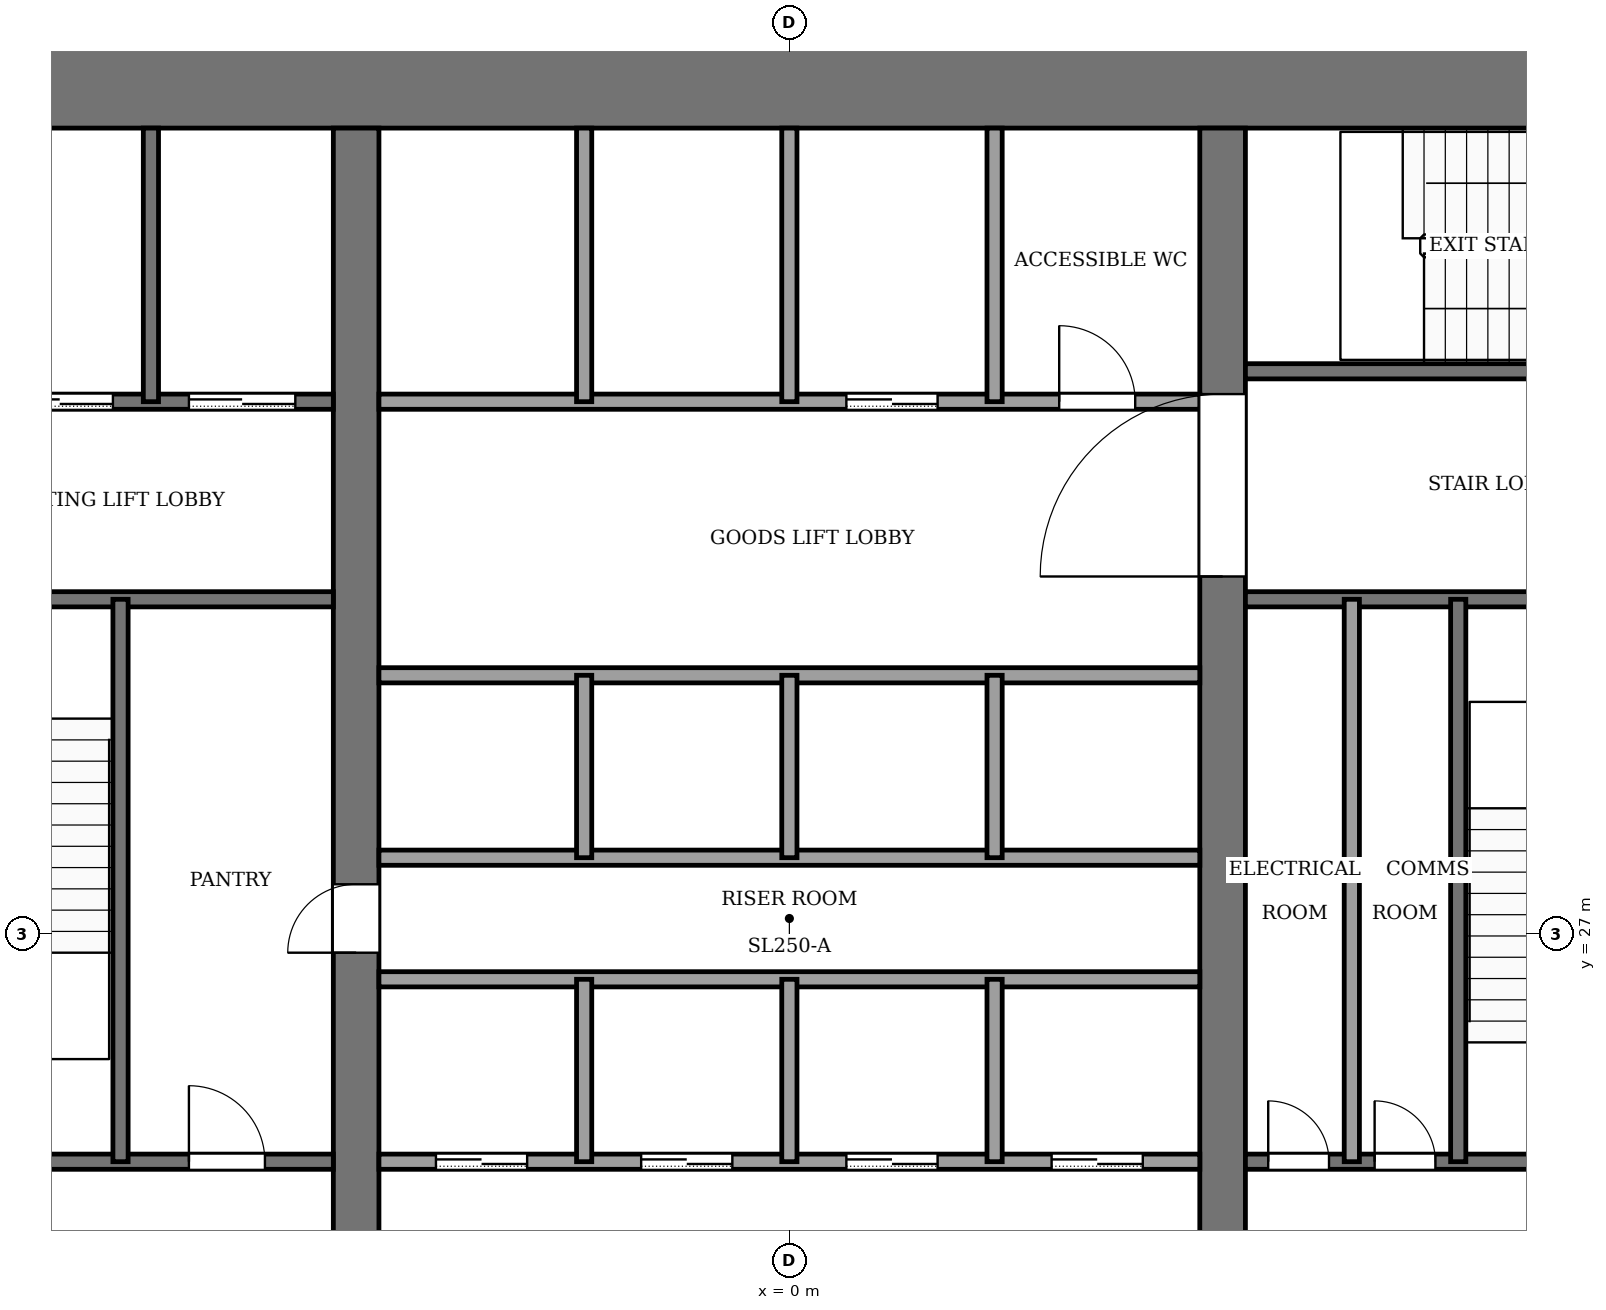
"""IFC4 building model, lengths in metres.
Left out: names, types, materials, properties, quantities, classifications, styles, units other than length and angle.
Written with IfcOpenShell. Run it as: python <this file> out.ifc"""

import sys

from ifc_helpers import new_model, si_unit, direction, frame, frame_2d, origin, place, context, subcontext, project, spatial, rectangle, extrude, element, fill, save


model = new_model("IFC4")
c1 = context("Model", 3, precision=1e-05, world=origin(), true_north=direction((0.0, 1.0)))
c2 = subcontext(c1, "Body", "Model", "MODEL_VIEW")
j1 = project(units=[si_unit("LENGTHUNIT", "METRE"), si_unit("PLANEANGLEUNIT", "RADIAN")], contexts=[c1])
p1 = place(None, origin())
s1 = spatial("IfcSite", under=j1, at=p1, CompositionType="ELEMENT")
p2 = place(p1, origin())
s2 = spatial("IfcBuilding", under=s1, at=p2, CompositionType="ELEMENT")
p3 = place(p2, frame((0.0, 0.0, 46.0)))
s3 = spatial("IfcBuildingStorey", under=s2, at=p3, CompositionType="ELEMENT", Elevation=46.0)
p4 = place(p3, frame((-14.0, 38.3, -0.13), z_axis=(0.0, 0.0, 1.0), x_axis=(1.0, 0.0, 0.0)))
e1 = element("IfcWall", 1, at=p4, inside=s3, PredefinedType="SHEAR", context=c2, shape_type="SweptSolid", body=[
    extrude(rectangle(XDim=28.0, YDim=1.4, at=frame_2d((14.0, 0.0))), origin(), (0.0, 0.0, 1.0), 4.0),
])
p5 = place(p3, frame((-5.7, 18.4, -0.13), z_axis=(0.0, 0.0, 1.0), x_axis=(0.0, 1.0, 0.0)))
e2 = element("IfcWall", 2, at=p5, inside=s3, PredefinedType="SHEAR", context=c2, shape_type="SweptSolid", body=[
    extrude(rectangle(XDim=19.2, YDim=0.6, at=frame_2d((9.6, 0.0))), origin(), (0.0, 0.0, 1.0), 4.0),
])
p6 = place(p5, frame((8.35, 0.0, 0.13)))
e3 = element("IfcOpeningElement", 3, at=p6, cuts=e2, PredefinedType="OPENING", context=c2, shape_type="SweptSolid", body=[
    extrude(rectangle(XDim=0.9, YDim=2.1, at=frame_2d((0.45, 1.05))), frame((0.0, 0.31, 0.0), z_axis=(0.0, -1.0, 0.0), x_axis=(1.0, 0.0, 0.0)), (0.0, 0.0, 1.0), 0.62),
])
p7 = place(p3, frame((5.7, 18.4, -0.13), z_axis=(0.0, 0.0, 1.0), x_axis=(0.0, 1.0, 0.0)))
e4 = element("IfcWall", 4, at=p7, inside=s3, PredefinedType="SHEAR", context=c2, shape_type="SweptSolid", body=[
    extrude(rectangle(XDim=19.2, YDim=0.6, at=frame_2d((9.6, 0.0))), origin(), (0.0, 0.0, 1.0), 4.0),
])
p8 = place(p7, frame((13.3, 0.0, 0.13)))
e5 = element("IfcOpeningElement", 5, at=p8, cuts=e4, PredefinedType="OPENING", context=c2, shape_type="SweptSolid", body=[
    extrude(rectangle(XDim=2.4, YDim=2.4, at=frame_2d((1.2, 1.2))), frame((0.0, 0.31, 0.0), z_axis=(0.0, -1.0, 0.0), x_axis=(1.0, 0.0, 0.0)), (0.0, 0.0, 1.0), 0.62),
])
p9 = place(p3, frame((-12.6, 24.0, 0.0), z_axis=(0.0, 0.0, 1.0), x_axis=(1.0, 0.0, 0.0)))
e6 = element("IfcWall", 6, at=p9, inside=s3, PredefinedType="PARTITIONING", context=c2, shape_type="SweptSolid", body=[
    extrude(rectangle(XDim=6.6, YDim=0.2, at=frame_2d((3.3, 0.0))), origin(), (0.0, 0.0, 1.0), 3.87),
])
p10 = place(p9, frame((4.7, 0.0, 0.0)))
e7 = element("IfcOpeningElement", 7, at=p10, cuts=e6, PredefinedType="OPENING", context=c2, shape_type="SweptSolid", body=[
    extrude(rectangle(XDim=1.0, YDim=2.1, at=frame_2d((0.5, 1.05))), frame((0.0, 0.11, 0.0), z_axis=(0.0, -1.0, 0.0), x_axis=(1.0, 0.0, 0.0)), (0.0, 0.0, 1.0), 0.22),
])
p11 = place(p3, frame((-5.4, 24.0, 0.0), z_axis=(0.0, 0.0, 1.0), x_axis=(1.0, 0.0, 0.0)))
e8 = element("IfcWall", 8, at=p11, inside=s3, PredefinedType="PARTITIONING", context=c2, shape_type="SweptSolid", body=[
    extrude(rectangle(XDim=10.8, YDim=0.2, at=frame_2d((5.4, 0.0))), origin(), (0.0, 0.0, 1.0), 3.87),
])
p12 = place(p11, frame((0.75, 0.0, 0.0)))
e9 = element("IfcOpeningElement", 9, at=p12, cuts=e8, PredefinedType="OPENING", context=c2, shape_type="SweptSolid", body=[
    extrude(rectangle(XDim=1.2, YDim=2.2, at=frame_2d((0.6, 1.1))), frame((0.0, 0.11, 0.0), z_axis=(0.0, -1.0, 0.0), x_axis=(1.0, 0.0, 0.0)), (0.0, 0.0, 1.0), 0.22),
])
p13 = place(p11, frame((3.45, 0.0, 0.0)))
e10 = element("IfcOpeningElement", 10, at=p13, cuts=e8, PredefinedType="OPENING", context=c2, shape_type="SweptSolid", body=[
    extrude(rectangle(XDim=1.2, YDim=2.2, at=frame_2d((0.6, 1.1))), frame((0.0, 0.11, 0.0), z_axis=(0.0, -1.0, 0.0), x_axis=(1.0, 0.0, 0.0)), (0.0, 0.0, 1.0), 0.22),
])
p14 = place(p11, frame((6.15, 0.0, 0.0)))
e11 = element("IfcOpeningElement", 11, at=p14, cuts=e8, PredefinedType="OPENING", context=c2, shape_type="SweptSolid", body=[
    extrude(rectangle(XDim=1.2, YDim=2.2, at=frame_2d((0.6, 1.1))), frame((0.0, 0.11, 0.0), z_axis=(0.0, -1.0, 0.0), x_axis=(1.0, 0.0, 0.0)), (0.0, 0.0, 1.0), 0.22),
])
p15 = place(p11, frame((8.85, 0.0, 0.0)))
e12 = element("IfcOpeningElement", 12, at=p15, cuts=e8, PredefinedType="OPENING", context=c2, shape_type="SweptSolid", body=[
    extrude(rectangle(XDim=1.2, YDim=2.2, at=frame_2d((0.6, 1.1))), frame((0.0, 0.11, 0.0), z_axis=(0.0, -1.0, 0.0), x_axis=(1.0, 0.0, 0.0)), (0.0, 0.0, 1.0), 0.22),
])
p16 = place(p3, frame((6.0, 24.0, 0.0), z_axis=(0.0, 0.0, 1.0), x_axis=(1.0, 0.0, 0.0)))
e13 = element("IfcWall", 13, at=p16, inside=s3, PredefinedType="PARTITIONING", context=c2, shape_type="SweptSolid", body=[
    extrude(rectangle(XDim=6.6, YDim=0.2, at=frame_2d((3.3, 0.0))), origin(), (0.0, 0.0, 1.0), 3.87),
])
p17 = place(p16, frame((0.3, 0.0, 0.0)))
e14 = element("IfcOpeningElement", 14, at=p17, cuts=e13, PredefinedType="OPENING", context=c2, shape_type="SweptSolid", body=[
    extrude(rectangle(XDim=0.8, YDim=2.1, at=frame_2d((0.4, 1.05))), frame((0.0, 0.11, 0.0), z_axis=(0.0, -1.0, 0.0), x_axis=(1.0, 0.0, 0.0)), (0.0, 0.0, 1.0), 0.22),
])
p18 = place(p16, frame((1.7, 0.0, 0.0)))
e15 = element("IfcOpeningElement", 15, at=p18, cuts=e13, PredefinedType="OPENING", context=c2, shape_type="SweptSolid", body=[
    extrude(rectangle(XDim=0.8, YDim=2.1, at=frame_2d((0.4, 1.05))), frame((0.0, 0.11, 0.0), z_axis=(0.0, -1.0, 0.0), x_axis=(1.0, 0.0, 0.0)), (0.0, 0.0, 1.0), 0.22),
])
p19 = place(p16, frame((4.4, 0.0, 0.0)))
e16 = element("IfcOpeningElement", 16, at=p19, cuts=e13, PredefinedType="OPENING", context=c2, shape_type="SweptSolid", body=[
    extrude(rectangle(XDim=1.2, YDim=2.2, at=frame_2d((0.6, 1.1))), frame((0.0, 0.11, 0.0), z_axis=(0.0, -1.0, 0.0), x_axis=(1.0, 0.0, 0.0)), (0.0, 0.0, 1.0), 0.22),
])
for number, where, z_axis, x_axis in (
    (17, (-5.4, 26.4, 0.0), (0.0, 0.0, 1.0), (1.0, 0.0, 0.0)),
    (18, (-5.4, 28.0, 0.0), (0.0, 0.0, 1.0), (1.0, 0.0, 0.0)),
    (19, (-5.4, 30.4, 0.0), (0.0, 0.0, 1.0), (1.0, 0.0, 0.0)),
):
    element("IfcWall", number, at=place(p3, frame(where, z_axis=z_axis, x_axis=x_axis)), inside=s3, PredefinedType="PARTITIONING", context=c2, shape_type="SweptSolid", body=[
        extrude(rectangle(XDim=10.8, YDim=0.2, at=frame_2d((5.4, 0.0))), origin(), (0.0, 0.0, 1.0), 3.87),
    ])
p20 = place(p3, frame((-12.6, 31.4, 0.0), z_axis=(0.0, 0.0, 1.0), x_axis=(1.0, 0.0, 0.0)))
e20 = element("IfcWall", 20, at=p20, inside=s3, PredefinedType="PARTITIONING", context=c2, shape_type="SweptSolid", body=[
    extrude(rectangle(XDim=6.6, YDim=0.2, at=frame_2d((3.3, 0.0))), origin(), (0.0, 0.0, 1.0), 3.87),
])
p21 = place(p20, frame((1.0, 0.0, 0.0)))
e21 = element("IfcOpeningElement", 21, at=p21, cuts=e20, PredefinedType="OPENING", context=c2, shape_type="SweptSolid", body=[
    extrude(rectangle(XDim=1.2, YDim=2.2, at=frame_2d((0.6, 1.1))), frame((0.0, 0.11, 0.0), z_axis=(0.0, -1.0, 0.0), x_axis=(1.0, 0.0, 0.0)), (0.0, 0.0, 1.0), 0.22),
])
p22 = place(p3, frame((6.0, 31.4, 0.0), z_axis=(0.0, 0.0, 1.0), x_axis=(1.0, 0.0, 0.0)))
e22 = element("IfcWall", 22, at=p22, inside=s3, PredefinedType="PARTITIONING", context=c2, shape_type="SweptSolid", body=[
    extrude(rectangle(XDim=6.6, YDim=0.2, at=frame_2d((3.3, 0.0))), origin(), (0.0, 0.0, 1.0), 3.87),
])
p23 = place(p3, frame((-12.6, 34.0, 0.0), z_axis=(0.0, 0.0, 1.0), x_axis=(1.0, 0.0, 0.0)))
e23 = element("IfcWall", 23, at=p23, inside=s3, PredefinedType="PARTITIONING", context=c2, shape_type="SweptSolid", body=[
    extrude(rectangle(XDim=6.6, YDim=0.2, at=frame_2d((3.3, 0.0))), origin(), (0.0, 0.0, 1.0), 3.87),
])
p24 = place(p23, frame((4.7, 0.0, 0.0)))
e24 = element("IfcOpeningElement", 24, at=p24, cuts=e23, PredefinedType="OPENING", context=c2, shape_type="SweptSolid", body=[
    extrude(rectangle(XDim=1.4, YDim=2.2, at=frame_2d((0.7, 1.1))), frame((0.0, 0.11, 0.0), z_axis=(0.0, -1.0, 0.0), x_axis=(1.0, 0.0, 0.0)), (0.0, 0.0, 1.0), 0.22),
])
p25 = place(p23, frame((2.3, 0.0, 0.0)))
e25 = element("IfcOpeningElement", 25, at=p25, cuts=e23, PredefinedType="OPENING", context=c2, shape_type="SweptSolid", body=[
    extrude(rectangle(XDim=1.4, YDim=2.2, at=frame_2d((0.7, 1.1))), frame((0.0, 0.11, 0.0), z_axis=(0.0, -1.0, 0.0), x_axis=(1.0, 0.0, 0.0)), (0.0, 0.0, 1.0), 0.22),
])
p26 = place(p23, frame((0.45, 0.0, 0.0)))
e26 = element("IfcOpeningElement", 26, at=p26, cuts=e23, PredefinedType="OPENING", context=c2, shape_type="SweptSolid", body=[
    extrude(rectangle(XDim=0.9, YDim=2.1, at=frame_2d((0.45, 1.05))), frame((0.0, 0.11, 0.0), z_axis=(0.0, -1.0, 0.0), x_axis=(1.0, 0.0, 0.0)), (0.0, 0.0, 1.0), 0.22),
])
p27 = place(p3, frame((-5.4, 34.0, 0.0), z_axis=(0.0, 0.0, 1.0), x_axis=(1.0, 0.0, 0.0)))
e27 = element("IfcWall", 27, at=p27, inside=s3, PredefinedType="PARTITIONING", context=c2, shape_type="SweptSolid", body=[
    extrude(rectangle(XDim=10.8, YDim=0.2, at=frame_2d((5.4, 0.0))), origin(), (0.0, 0.0, 1.0), 3.87),
])
p28 = place(p27, frame((6.15, 0.0, 0.0)))
e28 = element("IfcOpeningElement", 28, at=p28, cuts=e27, PredefinedType="OPENING", context=c2, shape_type="SweptSolid", body=[
    extrude(rectangle(XDim=1.2, YDim=2.2, at=frame_2d((0.6, 1.1))), frame((0.0, 0.11, 0.0), z_axis=(0.0, -1.0, 0.0), x_axis=(1.0, 0.0, 0.0)), (0.0, 0.0, 1.0), 0.22),
])
p29 = place(p27, frame((8.95, 0.0, 0.0)))
e29 = element("IfcOpeningElement", 29, at=p29, cuts=e27, PredefinedType="OPENING", context=c2, shape_type="SweptSolid", body=[
    extrude(rectangle(XDim=1.0, YDim=2.1, at=frame_2d((0.5, 1.05))), frame((0.0, 0.11, 0.0), z_axis=(0.0, -1.0, 0.0), x_axis=(1.0, 0.0, 0.0)), (0.0, 0.0, 1.0), 0.22),
])
p30 = place(p3, frame((6.0, 34.4, 0.0), z_axis=(0.0, 0.0, 1.0), x_axis=(1.0, 0.0, 0.0)))
e30 = element("IfcWall", 30, at=p30, inside=s3, PredefinedType="PARTITIONING", context=c2, shape_type="SweptSolid", body=[
    extrude(rectangle(XDim=6.6, YDim=0.2, at=frame_2d((3.3, 0.0))), origin(), (0.0, 0.0, 1.0), 3.87),
])
p31 = place(p30, frame((4.8, 0.0, 0.0)))
e31 = element("IfcOpeningElement", 31, at=p31, cuts=e30, PredefinedType="OPENING", context=c2, shape_type="SweptSolid", body=[
    extrude(rectangle(XDim=1.2, YDim=2.2, at=frame_2d((0.6, 1.1))), frame((0.0, 0.11, 0.0), z_axis=(0.0, -1.0, 0.0), x_axis=(1.0, 0.0, 0.0)), (0.0, 0.0, 1.0), 0.22),
])
p32 = place(p3, frame((-8.8, 24.0, 0.0), z_axis=(0.0, 0.0, 1.0), x_axis=(0.0, 1.0, 0.0)))
e32 = element("IfcWall", 32, at=p32, inside=s3, PredefinedType="PARTITIONING", context=c2, shape_type="SweptSolid", body=[
    extrude(rectangle(XDim=7.4, YDim=0.2, at=frame_2d((3.7, 0.0))), origin(), (0.0, 0.0, 1.0), 3.87),
])
p33 = place(p3, frame((-8.4, 34.0, 0.0), z_axis=(0.0, 0.0, 1.0), x_axis=(0.0, 1.0, 0.0)))
e33 = element("IfcWall", 33, at=p33, inside=s3, PredefinedType="PARTITIONING", context=c2, shape_type="SweptSolid", body=[
    extrude(rectangle(XDim=3.6, YDim=0.2, at=frame_2d((1.8, 0.0))), origin(), (0.0, 0.0, 1.0), 3.87),
])
for number, where, z_axis, x_axis in (
    (34, (-2.7, 24.0, 0.0), (0.0, 0.0, 1.0), (0.0, 1.0, 0.0)),
    (35, (-2.7, 28.0, 0.0), (0.0, 0.0, 1.0), (0.0, 1.0, 0.0)),
):
    element("IfcWall", number, at=place(p3, frame(where, z_axis=z_axis, x_axis=x_axis)), inside=s3, PredefinedType="PARTITIONING", context=c2, shape_type="SweptSolid", body=[
        extrude(rectangle(XDim=2.4, YDim=0.2, at=frame_2d((1.2, 0.0))), origin(), (0.0, 0.0, 1.0), 3.87),
    ])
p34 = place(p3, frame((-2.7, 34.0, 0.0), z_axis=(0.0, 0.0, 1.0), x_axis=(0.0, 1.0, 0.0)))
e36 = element("IfcWall", 36, at=p34, inside=s3, PredefinedType="PARTITIONING", context=c2, shape_type="SweptSolid", body=[
    extrude(rectangle(XDim=3.6, YDim=0.2, at=frame_2d((1.8, 0.0))), origin(), (0.0, 0.0, 1.0), 3.87),
])
for number, where, z_axis, x_axis in (
    (37, (0.0, 24.0, 0.0), (0.0, 0.0, 1.0), (0.0, 1.0, 0.0)),
    (38, (0.0, 28.0, 0.0), (0.0, 0.0, 1.0), (0.0, 1.0, 0.0)),
):
    element("IfcWall", number, at=place(p3, frame(where, z_axis=z_axis, x_axis=x_axis)), inside=s3, PredefinedType="PARTITIONING", context=c2, shape_type="SweptSolid", body=[
        extrude(rectangle(XDim=2.4, YDim=0.2, at=frame_2d((1.2, 0.0))), origin(), (0.0, 0.0, 1.0), 3.87),
    ])
p35 = place(p3, frame((0.0, 34.0, 0.0), z_axis=(0.0, 0.0, 1.0), x_axis=(0.0, 1.0, 0.0)))
e39 = element("IfcWall", 39, at=p35, inside=s3, PredefinedType="PARTITIONING", context=c2, shape_type="SweptSolid", body=[
    extrude(rectangle(XDim=3.6, YDim=0.2, at=frame_2d((1.8, 0.0))), origin(), (0.0, 0.0, 1.0), 3.87),
])
for number, where, z_axis, x_axis in (
    (40, (2.7, 24.0, 0.0), (0.0, 0.0, 1.0), (0.0, 1.0, 0.0)),
    (41, (2.7, 28.0, 0.0), (0.0, 0.0, 1.0), (0.0, 1.0, 0.0)),
):
    element("IfcWall", number, at=place(p3, frame(where, z_axis=z_axis, x_axis=x_axis)), inside=s3, PredefinedType="PARTITIONING", context=c2, shape_type="SweptSolid", body=[
        extrude(rectangle(XDim=2.4, YDim=0.2, at=frame_2d((1.2, 0.0))), origin(), (0.0, 0.0, 1.0), 3.87),
    ])
p36 = place(p3, frame((2.7, 34.0, 0.0), z_axis=(0.0, 0.0, 1.0), x_axis=(0.0, 1.0, 0.0)))
e42 = element("IfcWall", 42, at=p36, inside=s3, PredefinedType="PARTITIONING", context=c2, shape_type="SweptSolid", body=[
    extrude(rectangle(XDim=3.6, YDim=0.2, at=frame_2d((1.8, 0.0))), origin(), (0.0, 0.0, 1.0), 3.87),
])
for number, where, z_axis, x_axis in (
    (43, (7.4, 24.0, 0.0), (0.0, 0.0, 1.0), (0.0, 1.0, 0.0)),
    (44, (8.8, 24.0, 0.0), (0.0, 0.0, 1.0), (0.0, 1.0, 0.0)),
):
    element("IfcWall", number, at=place(p3, frame(where, z_axis=z_axis, x_axis=x_axis)), inside=s3, PredefinedType="PARTITIONING", context=c2, shape_type="SweptSolid", body=[
        extrude(rectangle(XDim=7.4, YDim=0.2, at=frame_2d((3.7, 0.0))), origin(), (0.0, 0.0, 1.0), 3.87),
    ])
p37 = place(p12, origin())
e45 = element("IfcDoor", 45, at=p37, inside=s3, OperationType="SLIDING_TO_LEFT", PredefinedType="DOOR", context=c2, shape_type="SweptSolid", body=[
    extrude(rectangle(XDim=1.2, YDim=2.2, at=frame_2d((0.6, 1.1))), frame((0.0, 0.025, 0.0), z_axis=(0.0, -1.0, 0.0), x_axis=(1.0, 0.0, 0.0)), (0.0, 0.0, 1.0), 0.05),
])
fill(e9, e45)
p38 = place(p13, origin())
e46 = element("IfcDoor", 46, at=p38, inside=s3, OperationType="SLIDING_TO_LEFT", PredefinedType="DOOR", context=c2, shape_type="SweptSolid", body=[
    extrude(rectangle(XDim=1.2, YDim=2.2, at=frame_2d((0.6, 1.1))), frame((0.0, 0.025, 0.0), z_axis=(0.0, -1.0, 0.0), x_axis=(1.0, 0.0, 0.0)), (0.0, 0.0, 1.0), 0.05),
])
fill(e10, e46)
p39 = place(p14, origin())
e47 = element("IfcDoor", 47, at=p39, inside=s3, OperationType="SLIDING_TO_LEFT", PredefinedType="DOOR", context=c2, shape_type="SweptSolid", body=[
    extrude(rectangle(XDim=1.2, YDim=2.2, at=frame_2d((0.6, 1.1))), frame((0.0, 0.025, 0.0), z_axis=(0.0, -1.0, 0.0), x_axis=(1.0, 0.0, 0.0)), (0.0, 0.0, 1.0), 0.05),
])
fill(e11, e47)
p40 = place(p15, origin())
e48 = element("IfcDoor", 48, at=p40, inside=s3, OperationType="SLIDING_TO_LEFT", PredefinedType="DOOR", context=c2, shape_type="SweptSolid", body=[
    extrude(rectangle(XDim=1.2, YDim=2.2, at=frame_2d((0.6, 1.1))), frame((0.0, 0.025, 0.0), z_axis=(0.0, -1.0, 0.0), x_axis=(1.0, 0.0, 0.0)), (0.0, 0.0, 1.0), 0.05),
])
fill(e12, e48)
p41 = place(p28, origin())
e49 = element("IfcDoor", 49, at=p41, inside=s3, OperationType="SLIDING_TO_LEFT", PredefinedType="DOOR", context=c2, shape_type="SweptSolid", body=[
    extrude(rectangle(XDim=1.2, YDim=2.2, at=frame_2d((0.6, 1.1))), frame((0.0, 0.025, 0.0), z_axis=(0.0, -1.0, 0.0), x_axis=(1.0, 0.0, 0.0)), (0.0, 0.0, 1.0), 0.05),
])
fill(e28, e49)
p42 = place(p24, origin())
e50 = element("IfcDoor", 50, at=p42, inside=s3, OperationType="SLIDING_TO_LEFT", PredefinedType="DOOR", context=c2, shape_type="SweptSolid", body=[
    extrude(rectangle(XDim=1.4, YDim=2.2, at=frame_2d((0.7, 1.1))), frame((0.0, 0.025, 0.0), z_axis=(0.0, -1.0, 0.0), x_axis=(1.0, 0.0, 0.0)), (0.0, 0.0, 1.0), 0.05),
])
fill(e24, e50)
p43 = place(p25, origin())
e51 = element("IfcDoor", 51, at=p43, inside=s3, OperationType="SLIDING_TO_LEFT", PredefinedType="DOOR", context=c2, shape_type="SweptSolid", body=[
    extrude(rectangle(XDim=1.4, YDim=2.2, at=frame_2d((0.7, 1.1))), frame((0.0, 0.025, 0.0), z_axis=(0.0, -1.0, 0.0), x_axis=(1.0, 0.0, 0.0)), (0.0, 0.0, 1.0), 0.05),
])
fill(e25, e51)
p44 = place(p10, origin())
e52 = element("IfcDoor", 52, at=p44, inside=s3, OperationType="SINGLE_SWING_LEFT", PredefinedType="DOOR", context=c2, shape_type="SweptSolid", body=[
    extrude(rectangle(XDim=1.0, YDim=2.1, at=frame_2d((0.5, 1.05))), frame((0.0, 0.025, 0.0), z_axis=(0.0, -1.0, 0.0), x_axis=(1.0, 0.0, 0.0)), (0.0, 0.0, 1.0), 0.05),
])
fill(e7, e52)
p45 = place(p17, origin())
e53 = element("IfcDoor", 53, at=p45, inside=s3, OperationType="SINGLE_SWING_LEFT", PredefinedType="DOOR", context=c2, shape_type="SweptSolid", body=[
    extrude(rectangle(XDim=0.8, YDim=2.1, at=frame_2d((0.4, 1.05))), frame((0.0, 0.025, 0.0), z_axis=(0.0, -1.0, 0.0), x_axis=(1.0, 0.0, 0.0)), (0.0, 0.0, 1.0), 0.05),
])
fill(e14, e53)
p46 = place(p18, origin())
e54 = element("IfcDoor", 54, at=p46, inside=s3, OperationType="SINGLE_SWING_RIGHT", PredefinedType="DOOR", context=c2, shape_type="SweptSolid", body=[
    extrude(rectangle(XDim=0.8, YDim=2.1, at=frame_2d((0.4, 1.05))), frame((0.0, 0.025, 0.0), z_axis=(0.0, -1.0, 0.0), x_axis=(1.0, 0.0, 0.0)), (0.0, 0.0, 1.0), 0.05),
])
fill(e15, e54)
p47 = place(p29, origin())
e55 = element("IfcDoor", 55, at=p47, inside=s3, OperationType="SINGLE_SWING_LEFT", PredefinedType="DOOR", context=c2, shape_type="SweptSolid", body=[
    extrude(rectangle(XDim=1.0, YDim=2.1, at=frame_2d((0.5, 1.05))), frame((0.0, 0.025, 0.0), z_axis=(0.0, -1.0, 0.0), x_axis=(1.0, 0.0, 0.0)), (0.0, 0.0, 1.0), 0.05),
])
fill(e29, e55)
p48 = place(p6, origin())
e56 = element("IfcDoor", 56, at=p48, inside=s3, OperationType="SINGLE_SWING_RIGHT", PredefinedType="DOOR", context=c2, shape_type="SweptSolid", body=[
    extrude(rectangle(XDim=0.9, YDim=2.1, at=frame_2d((0.45, 1.05))), frame((0.0, 0.025, 0.0), z_axis=(0.0, -1.0, 0.0), x_axis=(1.0, 0.0, 0.0)), (0.0, 0.0, 1.0), 0.05),
])
fill(e3, e56)
p49 = place(p8, origin())
e57 = element("IfcDoor", 57, at=p49, inside=s3, OperationType="DOUBLE_DOOR_SINGLE_SWING", PredefinedType="DOOR", context=c2, shape_type="SweptSolid", body=[
    extrude(rectangle(XDim=2.4, YDim=2.4, at=frame_2d((1.2, 1.2))), frame((0.0, 0.025, 0.0), z_axis=(0.0, -1.0, 0.0), x_axis=(1.0, 0.0, 0.0)), (0.0, 0.0, 1.0), 0.05),
])
fill(e5, e57)
save(model, sys.argv[1])
